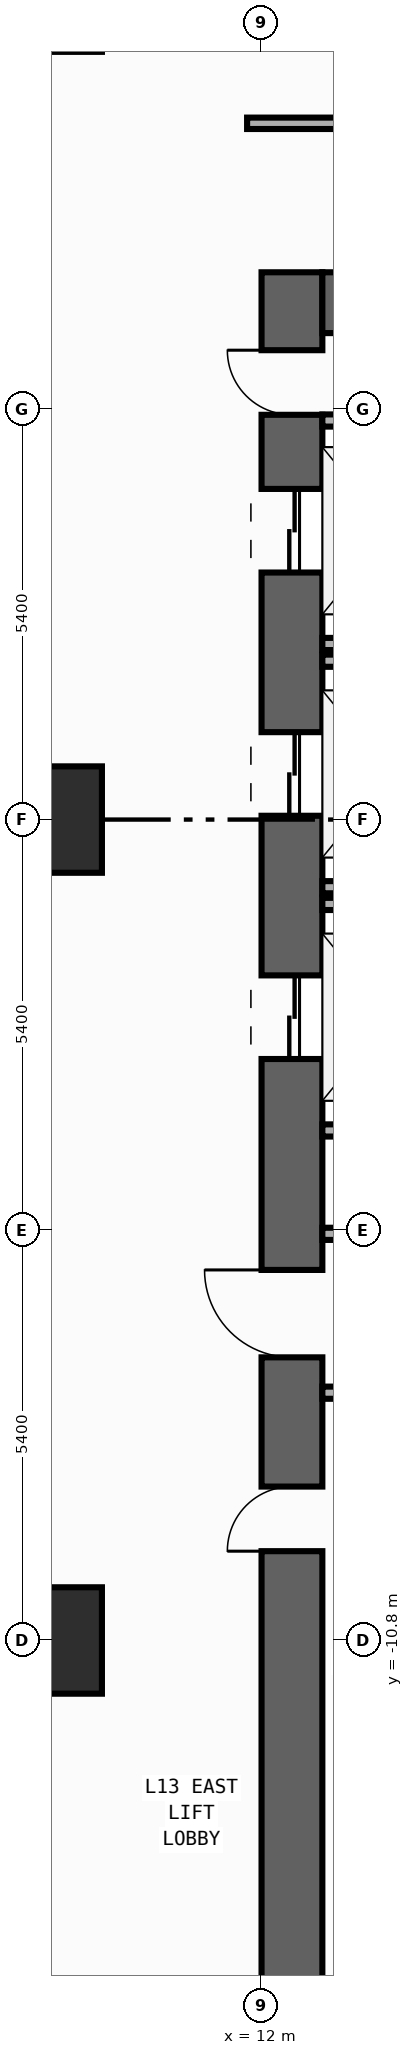
"""IFC4 building model, lengths in metres.
Left out: names, types, materials, properties, quantities, classifications, styles, units other than length and angle.
Written with IfcOpenShell. Run it as: python <this file> out.ifc"""

import sys

from ifc_helpers import new_model, si_unit, direction, frame, frame_2d, origin, origin_2d, place, context, subcontext, project, spatial, rectangle, extrude, element, fill, save


model = new_model("IFC4")
c1 = context("Model", 3, precision=1e-05, world=origin(), true_north=direction((0.0, 1.0)))
c2 = subcontext(c1, "Body", "Model", "MODEL_VIEW")
j1 = project(units=[si_unit("LENGTHUNIT", "METRE"), si_unit("PLANEANGLEUNIT", "RADIAN")], contexts=[c1])
p1 = place(None, origin())
s1 = spatial("IfcSite", under=j1, at=p1, CompositionType="ELEMENT")
p2 = place(p1, origin())
s2 = spatial("IfcBuilding", under=s1, at=p2, CompositionType="ELEMENT")
p3 = place(p2, frame((0.0, 0.0, 55.4)))
s3 = spatial("IfcBuildingStorey", under=s2, at=p3, CompositionType="ELEMENT", Elevation=55.4)
p4 = place(p3, frame((12.4, -19.8, 0.0), z_axis=(0.0, 0.0, 1.0), x_axis=(0.0, 1.0, 0.0)))
e1 = element("IfcWall", 1, at=p4, inside=s3, PredefinedType="SHEAR", context=c2, shape_type="SweptSolid", body=[
    extrude(rectangle(XDim=27.0, YDim=0.8, at=frame_2d((13.5, 0.0))), origin(), (0.0, 0.0, 1.0), 3.94),
])
p5 = place(p4, frame((23.05, 0.0, 0.0)))
e2 = element("IfcOpeningElement", 2, at=p5, cuts=e1, PredefinedType="OPENING", context=c2, shape_type="SweptSolid", body=[
    extrude(rectangle(XDim=1.1, YDim=2.2, at=frame_2d((0.55, 1.1))), frame((0.0, 0.41, 0.0), z_axis=(0.0, -1.0, 0.0), x_axis=(1.0, 0.0, 0.0)), (0.0, 0.0, 1.0), 0.82),
])
p6 = place(p4, frame((19.85, 0.0, 0.0)))
e3 = element("IfcOpeningElement", 3, at=p6, cuts=e1, PredefinedType="OPENING", context=c2, shape_type="SweptSolid", body=[
    extrude(rectangle(XDim=1.1, YDim=2.2, at=frame_2d((0.55, 1.1))), frame((0.0, 0.41, 0.0), z_axis=(0.0, -1.0, 0.0), x_axis=(1.0, 0.0, 0.0)), (0.0, 0.0, 1.0), 0.82),
])
p7 = place(p4, frame((16.65, 0.0, 0.0)))
e4 = element("IfcOpeningElement", 4, at=p7, cuts=e1, PredefinedType="OPENING", context=c2, shape_type="SweptSolid", body=[
    extrude(rectangle(XDim=1.1, YDim=2.2, at=frame_2d((0.55, 1.1))), frame((0.0, 0.41, 0.0), z_axis=(0.0, -1.0, 0.0), x_axis=(1.0, 0.0, 0.0)), (0.0, 0.0, 1.0), 0.82),
])
p8 = place(p4, frame((10.175, 0.0, 0.0)))
e5 = element("IfcOpeningElement", 5, at=p8, cuts=e1, PredefinedType="OPENING", context=c2, shape_type="SweptSolid", body=[
    extrude(rectangle(XDim=0.85, YDim=2.1, at=frame_2d((0.425, 1.05))), frame((0.0, 0.41, 0.0), z_axis=(0.0, -1.0, 0.0), x_axis=(1.0, 0.0, 0.0)), (0.0, 0.0, 1.0), 0.82),
])
p9 = place(p4, frame((12.725, 0.0, 0.0)))
e6 = element("IfcOpeningElement", 6, at=p9, cuts=e1, PredefinedType="OPENING", context=c2, shape_type="SweptSolid", body=[
    extrude(rectangle(XDim=1.15, YDim=2.2, at=frame_2d((0.575, 1.1))), frame((0.0, 0.41, 0.0), z_axis=(0.0, -1.0, 0.0), x_axis=(1.0, 0.0, 0.0)), (0.0, 0.0, 1.0), 0.82),
])
p10 = place(p4, frame((25.125, 0.0, 0.0)))
e7 = element("IfcOpeningElement", 7, at=p10, cuts=e1, PredefinedType="OPENING", context=c2, shape_type="SweptSolid", body=[
    extrude(rectangle(XDim=0.85, YDim=2.1, at=frame_2d((0.425, 1.05))), frame((0.0, 0.41, 0.0), z_axis=(0.0, -1.0, 0.0), x_axis=(1.0, 0.0, 0.0)), (0.0, 0.0, 1.0), 0.82),
])
p11 = place(p3, frame((12.8, 6.8, 0.0), z_axis=(0.0, 0.0, 1.0), x_axis=(1.0, 0.0, 0.0)))
e8 = element("IfcWall", 8, at=p11, inside=s3, PredefinedType="SHEAR", context=c2, shape_type="SweptSolid", body=[
    extrude(rectangle(XDim=6.8, YDim=0.8, at=frame_2d((3.4, 0.0))), origin(), (0.0, 0.0, 1.0), 3.94),
])
for number, where, z_axis, x_axis in (
    (9, (9.2, -10.8, 0.0), (0.0, 0.0, 1.0), (1.0, 0.0, 0.0)),
    (10, (9.2, 0.0, 0.0), (0.0, 0.0, 1.0), (1.0, 0.0, 0.0)),
):
    element("IfcColumn", number, at=place(p3, frame(where, z_axis=z_axis, x_axis=x_axis)), inside=s3, PredefinedType="COLUMN", context=c2, shape_type="SweptSolid", body=[
        extrude(rectangle(XDim=1.4, YDim=1.4, at=origin_2d()), origin(), (0.0, 0.0, 1.0), 4.2),
    ])
for number, where, z_axis, x_axis in (
    (11, (12.8, 2.31, 0.0), (0.0, 0.0, 1.0), (1.0, 0.0, 0.0)),
    (12, (12.8, -0.89, 0.0), (0.0, 0.0, 1.0), (1.0, 0.0, 0.0)),
    (13, (12.8, 2.09, 0.0), (0.0, 0.0, 1.0), (1.0, 0.0, 0.0)),
    (14, (12.8, -4.09, 0.0), (0.0, 0.0, 1.0), (1.0, 0.0, 0.0)),
    (15, (12.8, -1.11, 0.0), (0.0, 0.0, 1.0), (1.0, 0.0, 0.0)),
):
    element("IfcWall", number, at=place(p3, frame(where, z_axis=z_axis, x_axis=x_axis)), inside=s3, PredefinedType="STANDARD", context=c2, shape_type="SweptSolid", body=[
        extrude(rectangle(XDim=2.19, YDim=0.16, at=frame_2d((1.095, 0.0))), origin(), (0.0, 0.0, 1.0), 3.94),
    ])
for number, where, z_axis, x_axis in (
    (16, (12.8, -5.45, 0.0), (0.0, 0.0, 1.0), (1.0, 0.0, 0.0)),
    (17, (12.8, -7.54, 0.0), (0.0, 0.0, 1.0), (1.0, 0.0, 0.0)),
    (18, (12.8, 5.25, 0.0), (0.0, 0.0, 1.0), (1.0, 0.0, 0.0)),
):
    element("IfcWall", number, at=place(p3, frame(where, z_axis=z_axis, x_axis=x_axis)), inside=s3, PredefinedType="STANDARD", context=c2, shape_type="SweptSolid", body=[
        extrude(rectangle(XDim=2.6, YDim=0.16, at=frame_2d((1.3, 0.0))), origin(), (0.0, 0.0, 1.0), 3.94),
    ])
p12 = place(p3, frame((11.81, 9.16, 0.0), z_axis=(0.0, 0.0, 1.0), x_axis=(1.0, 0.0, 0.0)))
e19 = element("IfcWall", 19, at=p12, inside=s3, PredefinedType="PARTITIONING", context=c2, shape_type="SweptSolid", body=[
    extrude(rectangle(XDim=8.83, YDim=0.15, at=frame_2d((4.415, 0.0))), origin(), (0.0, 0.0, 1.0), 3.94),
])
p13 = place(p12, frame((5.067, 0.0, 0.0)))
e20 = element("IfcOpeningElement", 20, at=p13, cuts=e19, PredefinedType="OPENING", context=c2, shape_type="SweptSolid", body=[
    extrude(rectangle(XDim=0.9, YDim=2.15, at=frame_2d((0.45, 1.075))), frame((0.0, 0.085, 0.0), z_axis=(0.0, -1.0, 0.0), x_axis=(1.0, 0.0, 0.0)), (0.0, 0.0, 1.0), 0.17),
])
p14 = place(p5, origin())
e21 = element("IfcDoor", 21, at=p14, inside=s3, OperationType="DOUBLE_DOOR_SLIDING", PredefinedType="DOOR", context=c2, shape_type="SweptSolid", body=[
    extrude(rectangle(XDim=1.1, YDim=2.2, at=frame_2d((0.55, 1.1))), frame((0.0, 0.025, 0.0), z_axis=(0.0, -1.0, 0.0), x_axis=(1.0, 0.0, 0.0)), (0.0, 0.0, 1.0), 0.05),
])
fill(e2, e21)
p15 = place(p6, origin())
e22 = element("IfcDoor", 22, at=p15, inside=s3, OperationType="DOUBLE_DOOR_SLIDING", PredefinedType="DOOR", context=c2, shape_type="SweptSolid", body=[
    extrude(rectangle(XDim=1.1, YDim=2.2, at=frame_2d((0.55, 1.1))), frame((0.0, 0.025, 0.0), z_axis=(0.0, -1.0, 0.0), x_axis=(1.0, 0.0, 0.0)), (0.0, 0.0, 1.0), 0.05),
])
fill(e3, e22)
p16 = place(p7, origin())
e23 = element("IfcDoor", 23, at=p16, inside=s3, OperationType="DOUBLE_DOOR_SLIDING", PredefinedType="DOOR", context=c2, shape_type="SweptSolid", body=[
    extrude(rectangle(XDim=1.1, YDim=2.2, at=frame_2d((0.55, 1.1))), frame((0.0, 0.025, 0.0), z_axis=(0.0, -1.0, 0.0), x_axis=(1.0, 0.0, 0.0)), (0.0, 0.0, 1.0), 0.05),
])
fill(e4, e23)
p17 = place(p8, origin())
e24 = element("IfcDoor", 24, at=p17, inside=s3, OperationType="SINGLE_SWING_LEFT", PredefinedType="DOOR", context=c2, shape_type="SweptSolid", body=[
    extrude(rectangle(XDim=0.85, YDim=2.1, at=frame_2d((0.425, 1.05))), frame((0.0, 0.025, 0.0), z_axis=(0.0, -1.0, 0.0), x_axis=(1.0, 0.0, 0.0)), (0.0, 0.0, 1.0), 0.05),
])
fill(e5, e24)
p18 = place(p9, origin())
e25 = element("IfcDoor", 25, at=p18, inside=s3, OperationType="SINGLE_SWING_RIGHT", PredefinedType="DOOR", context=c2, shape_type="SweptSolid", body=[
    extrude(rectangle(XDim=1.15, YDim=2.2, at=frame_2d((0.575, 1.1))), frame((0.0, 0.025, 0.0), z_axis=(0.0, -1.0, 0.0), x_axis=(1.0, 0.0, 0.0)), (0.0, 0.0, 1.0), 0.05),
])
fill(e6, e25)
p19 = place(p10, origin())
e26 = element("IfcDoor", 26, at=p19, inside=s3, OperationType="SINGLE_SWING_RIGHT", PredefinedType="DOOR", context=c2, shape_type="SweptSolid", body=[
    extrude(rectangle(XDim=0.85, YDim=2.1, at=frame_2d((0.425, 1.05))), frame((0.0, 0.025, 0.0), z_axis=(0.0, -1.0, 0.0), x_axis=(1.0, 0.0, 0.0)), (0.0, 0.0, 1.0), 0.05),
])
fill(e7, e26)
save(model, sys.argv[1])
